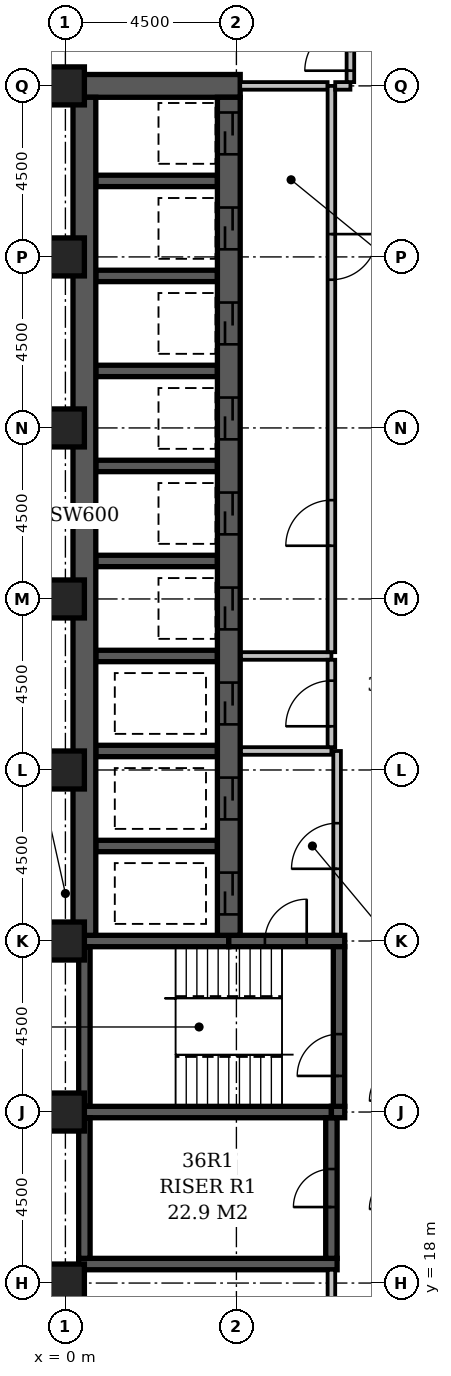
"""IFC4 building model, lengths in metres.
Left out: names, types, materials, properties, quantities, classifications, styles, units other than length and angle.
Written with IfcOpenShell. Run it as: python <this file> out.ifc"""

import sys

from ifc_helpers import new_model, si_unit, direction, frame, frame_2d, origin, origin_2d, place, context, subcontext, project, spatial, rectangle, extrude, element, fill, save


model = new_model("IFC4")
c1 = context("Model", 3, precision=1e-05, world=origin(), true_north=direction((0.0, 1.0)))
c2 = subcontext(c1, "Body", "Model", "MODEL_VIEW")
j1 = project(units=[si_unit("LENGTHUNIT", "METRE"), si_unit("PLANEANGLEUNIT", "RADIAN")], contexts=[c1])
p1 = place(None, origin())
s1 = spatial("IfcSite", under=j1, at=p1, CompositionType="ELEMENT")
p2 = place(p1, origin())
s2 = spatial("IfcBuilding", under=s1, at=p2, CompositionType="ELEMENT")
p3 = place(p2, frame((0.0, 0.0, 144.8)))
s3 = spatial("IfcBuildingStorey", under=s2, at=p3, CompositionType="ELEMENT", Elevation=144.8)
p4 = place(p3, frame((0.2, 49.5, -0.3), z_axis=(0.0, 0.0, 1.0), x_axis=(1.0, 0.0, 0.0)))
e1 = element("IfcWall", 1, at=p4, inside=s3, PredefinedType="SHEAR", context=c2, shape_type="SweptSolid", body=[
    extrude(rectangle(XDim=4.4, YDim=0.6, at=frame_2d((2.2, 0.0))), origin(), (0.0, 0.0, 1.0), 3.6),
])
p5 = place(p3, frame((0.35, 18.5, -0.3), z_axis=(0.0, 0.0, 1.0), x_axis=(1.0, 0.0, 0.0)))
e2 = element("IfcWall", 2, at=p5, inside=s3, PredefinedType="SHEAR", context=c2, shape_type="SweptSolid", body=[
    extrude(rectangle(XDim=6.8, YDim=0.3, at=frame_2d((3.4, 0.0))), origin(), (0.0, 0.0, 1.0), 3.6),
])
p6 = place(p3, frame((0.35, 22.5, -0.3), z_axis=(0.0, 0.0, 1.0), x_axis=(1.0, 0.0, 0.0)))
e3 = element("IfcWall", 3, at=p6, inside=s3, PredefinedType="SHEAR", context=c2, shape_type="SweptSolid", body=[
    extrude(rectangle(XDim=6.65, YDim=0.3, at=frame_2d((3.325, 0.0))), origin(), (0.0, 0.0, 1.0), 3.6),
])
p7 = place(p3, frame((0.35, 27.0, -0.3), z_axis=(0.0, 0.0, 1.0), x_axis=(1.0, 0.0, 0.0)))
e4 = element("IfcWall", 4, at=p7, inside=s3, PredefinedType="SHEAR", context=c2, shape_type="SweptSolid", body=[
    extrude(rectangle(XDim=3.95, YDim=0.3, at=frame_2d((1.975, 0.0))), origin(), (0.0, 0.0, 1.0), 3.6),
])
p8 = place(p3, frame((0.5, 18.65, -0.3), z_axis=(0.0, 0.0, 1.0), x_axis=(0.0, 1.0, 0.0)))
e5 = element("IfcWall", 5, at=p8, inside=s3, PredefinedType="SHEAR", context=c2, shape_type="SweptSolid", body=[
    extrude(rectangle(XDim=3.7, YDim=0.3, at=frame_2d((1.85, 0.0))), origin(), (0.0, 0.0, 1.0), 3.6),
])
p9 = place(p3, frame((0.5, 22.65, -0.3), z_axis=(0.0, 0.0, 1.0), x_axis=(0.0, 1.0, 0.0)))
e6 = element("IfcWall", 6, at=p9, inside=s3, PredefinedType="SHEAR", context=c2, shape_type="SweptSolid", body=[
    extrude(rectangle(XDim=4.2, YDim=0.3, at=frame_2d((2.1, 0.0))), origin(), (0.0, 0.0, 1.0), 3.6),
])
p10 = place(p3, frame((0.5, 27.15, -0.3), z_axis=(0.0, 0.0, 1.0), x_axis=(0.0, 1.0, 0.0)))
e7 = element("IfcWall", 7, at=p10, inside=s3, PredefinedType="SHEAR", context=c2, shape_type="SweptSolid", body=[
    extrude(rectangle(XDim=22.05, YDim=0.6, at=frame_2d((11.025, 0.0))), origin(), (0.0, 0.0, 1.0), 3.6),
])
for number, where, z_axis, x_axis in (
    (8, (0.8, 29.5, -0.3), (0.0, 0.0, 1.0), (1.0, 0.0, 0.0)),
    (9, (0.8, 32.0, -0.3), (0.0, 0.0, 1.0), (1.0, 0.0, 0.0)),
    (10, (0.8, 34.5, -0.3), (0.0, 0.0, 1.0), (1.0, 0.0, 0.0)),
    (11, (0.8, 37.0, -0.3), (0.0, 0.0, 1.0), (1.0, 0.0, 0.0)),
    (12, (0.8, 39.5, -0.3), (0.0, 0.0, 1.0), (1.0, 0.0, 0.0)),
    (13, (0.8, 42.0, -0.3), (0.0, 0.0, 1.0), (1.0, 0.0, 0.0)),
    (14, (0.8, 44.5, -0.3), (0.0, 0.0, 1.0), (1.0, 0.0, 0.0)),
    (15, (0.8, 47.0, -0.3), (0.0, 0.0, 1.0), (1.0, 0.0, 0.0)),
):
    element("IfcWall", number, at=place(p3, frame(where, z_axis=z_axis, x_axis=x_axis)), inside=s3, PredefinedType="SHEAR", context=c2, shape_type="SweptSolid", body=[
        extrude(rectangle(XDim=3.2, YDim=0.3, at=frame_2d((1.6, 0.0))), origin(), (0.0, 0.0, 1.0), 3.6),
    ])
p11 = place(p3, frame((4.3, 27.0, -0.3), z_axis=(0.0, 0.0, 1.0), x_axis=(1.0, 0.0, 0.0)))
e16 = element("IfcWall", 16, at=p11, inside=s3, PredefinedType="SHEAR", context=c2, shape_type="SweptSolid", body=[
    extrude(rectangle(XDim=3.05, YDim=0.3, at=frame_2d((1.525, 0.0))), origin(), (0.0, 0.0, 1.0), 3.6),
])
p12 = place(p11, frame((0.95, 0.0, 0.3)))
e17 = element("IfcOpeningElement", 17, at=p12, cuts=e16, PredefinedType="OPENING", context=c2, shape_type="SweptSolid", body=[
    extrude(rectangle(XDim=1.1, YDim=2.1, at=frame_2d((0.55, 1.05))), frame((0.0, 0.162, 0.0), z_axis=(0.0, -1.0, 0.0), x_axis=(1.0, 0.0, 0.0)), (0.0, 0.0, 1.0), 0.324),
])
p13 = place(p3, frame((4.3, 27.15, -0.3), z_axis=(0.0, 0.0, 1.0), x_axis=(0.0, 1.0, 0.0)))
e18 = element("IfcWall", 18, at=p13, inside=s3, PredefinedType="SHEAR", context=c2, shape_type="SweptSolid", body=[
    extrude(rectangle(XDim=22.05, YDim=0.6, at=frame_2d((11.025, 0.0))), origin(), (0.0, 0.0, 1.0), 3.6),
])
p14 = place(p13, frame((3.05, 0.0, 0.3)))
e19 = element("IfcOpeningElement", 19, at=p14, cuts=e18, PredefinedType="OPENING", context=c2, shape_type="SweptSolid", body=[
    extrude(rectangle(XDim=1.1, YDim=2.1, at=frame_2d((0.55, 1.05))), frame((0.0, 0.312, 0.0), z_axis=(0.0, -1.0, 0.0), x_axis=(1.0, 0.0, 0.0)), (0.0, 0.0, 1.0), 0.624),
])
p15 = place(p13, frame((0.55, 0.0, 0.3)))
e20 = element("IfcOpeningElement", 20, at=p15, cuts=e18, PredefinedType="OPENING", context=c2, shape_type="SweptSolid", body=[
    extrude(rectangle(XDim=1.1, YDim=2.1, at=frame_2d((0.55, 1.05))), frame((0.0, 0.312, 0.0), z_axis=(0.0, -1.0, 0.0), x_axis=(1.0, 0.0, 0.0)), (0.0, 0.0, 1.0), 0.624),
])
p16 = place(p13, frame((20.55, 0.0, 0.3)))
e21 = element("IfcOpeningElement", 21, at=p16, cuts=e18, PredefinedType="OPENING", context=c2, shape_type="SweptSolid", body=[
    extrude(rectangle(XDim=1.1, YDim=2.1, at=frame_2d((0.55, 1.05))), frame((0.0, 0.312, 0.0), z_axis=(0.0, -1.0, 0.0), x_axis=(1.0, 0.0, 0.0)), (0.0, 0.0, 1.0), 0.624),
])
p17 = place(p13, frame((18.05, 0.0, 0.3)))
e22 = element("IfcOpeningElement", 22, at=p17, cuts=e18, PredefinedType="OPENING", context=c2, shape_type="SweptSolid", body=[
    extrude(rectangle(XDim=1.1, YDim=2.1, at=frame_2d((0.55, 1.05))), frame((0.0, 0.312, 0.0), z_axis=(0.0, -1.0, 0.0), x_axis=(1.0, 0.0, 0.0)), (0.0, 0.0, 1.0), 0.624),
])
p18 = place(p13, frame((15.55, 0.0, 0.3)))
e23 = element("IfcOpeningElement", 23, at=p18, cuts=e18, PredefinedType="OPENING", context=c2, shape_type="SweptSolid", body=[
    extrude(rectangle(XDim=1.1, YDim=2.1, at=frame_2d((0.55, 1.05))), frame((0.0, 0.312, 0.0), z_axis=(0.0, -1.0, 0.0), x_axis=(1.0, 0.0, 0.0)), (0.0, 0.0, 1.0), 0.624),
])
p19 = place(p13, frame((13.05, 0.0, 0.3)))
e24 = element("IfcOpeningElement", 24, at=p19, cuts=e18, PredefinedType="OPENING", context=c2, shape_type="SweptSolid", body=[
    extrude(rectangle(XDim=1.1, YDim=2.1, at=frame_2d((0.55, 1.05))), frame((0.0, 0.312, 0.0), z_axis=(0.0, -1.0, 0.0), x_axis=(1.0, 0.0, 0.0)), (0.0, 0.0, 1.0), 0.624),
])
p20 = place(p13, frame((10.55, 0.0, 0.3)))
e25 = element("IfcOpeningElement", 25, at=p20, cuts=e18, PredefinedType="OPENING", context=c2, shape_type="SweptSolid", body=[
    extrude(rectangle(XDim=1.1, YDim=2.1, at=frame_2d((0.55, 1.05))), frame((0.0, 0.312, 0.0), z_axis=(0.0, -1.0, 0.0), x_axis=(1.0, 0.0, 0.0)), (0.0, 0.0, 1.0), 0.624),
])
p21 = place(p13, frame((8.05, 0.0, 0.3)))
e26 = element("IfcOpeningElement", 26, at=p21, cuts=e18, PredefinedType="OPENING", context=c2, shape_type="SweptSolid", body=[
    extrude(rectangle(XDim=1.1, YDim=2.1, at=frame_2d((0.55, 1.05))), frame((0.0, 0.312, 0.0), z_axis=(0.0, -1.0, 0.0), x_axis=(1.0, 0.0, 0.0)), (0.0, 0.0, 1.0), 0.624),
])
p22 = place(p13, frame((5.55, 0.0, 0.3)))
e27 = element("IfcOpeningElement", 27, at=p22, cuts=e18, PredefinedType="OPENING", context=c2, shape_type="SweptSolid", body=[
    extrude(rectangle(XDim=1.1, YDim=2.1, at=frame_2d((0.55, 1.05))), frame((0.0, 0.312, 0.0), z_axis=(0.0, -1.0, 0.0), x_axis=(1.0, 0.0, 0.0)), (0.0, 0.0, 1.0), 0.624),
])
p23 = place(p3, frame((7.0, 18.65, -0.3), z_axis=(0.0, 0.0, 1.0), x_axis=(0.0, 1.0, 0.0)))
e28 = element("IfcWall", 28, at=p23, inside=s3, PredefinedType="SHEAR", context=c2, shape_type="SweptSolid", body=[
    extrude(rectangle(XDim=3.7, YDim=0.3, at=frame_2d((1.85, 0.0))), origin(), (0.0, 0.0, 1.0), 3.6),
])
p24 = place(p23, frame((1.35, 0.0, 0.3)))
e29 = element("IfcOpeningElement", 29, at=p24, cuts=e28, PredefinedType="OPENING", context=c2, shape_type="SweptSolid", body=[
    extrude(rectangle(XDim=1.0, YDim=2.1, at=frame_2d((0.5, 1.05))), frame((0.0, 0.162, 0.0), z_axis=(0.0, -1.0, 0.0), x_axis=(1.0, 0.0, 0.0)), (0.0, 0.0, 1.0), 0.324),
])
p25 = place(p3, frame((7.0, 22.5, -0.3), z_axis=(0.0, 0.0, 1.0), x_axis=(1.0, 0.0, 0.0)))
e30 = element("IfcWall", 30, at=p25, inside=s3, PredefinedType="SHEAR", context=c2, shape_type="SweptSolid", body=[
    extrude(rectangle(XDim=0.35, YDim=0.3, at=frame_2d((0.175, 0.0))), origin(), (0.0, 0.0, 1.0), 3.6),
])
p26 = place(p3, frame((7.2, 22.65, -0.3), z_axis=(0.0, 0.0, 1.0), x_axis=(0.0, 1.0, 0.0)))
e31 = element("IfcWall", 31, at=p26, inside=s3, PredefinedType="SHEAR", context=c2, shape_type="SweptSolid", body=[
    extrude(rectangle(XDim=4.2, YDim=0.3, at=frame_2d((2.1, 0.0))), origin(), (0.0, 0.0, 1.0), 3.6),
])
p27 = place(p26, frame((0.8, 0.0, 0.3)))
e32 = element("IfcOpeningElement", 32, at=p27, cuts=e31, PredefinedType="OPENING", context=c2, shape_type="SweptSolid", body=[
    extrude(rectangle(XDim=1.1, YDim=2.1, at=frame_2d((0.55, 1.05))), frame((0.0, 0.162, 0.0), z_axis=(0.0, -1.0, 0.0), x_axis=(1.0, 0.0, 0.0)), (0.0, 0.0, 1.0), 0.324),
])
for number, where, z_axis, x_axis in (
    (33, (0.0, 18.0, -0.3), (0.0, 0.0, 1.0), (1.0, 0.0, 0.0)),
    (34, (0.0, 22.5, -0.3), (0.0, 0.0, 1.0), (1.0, 0.0, 0.0)),
    (35, (0.0, 27.0, -0.3), (0.0, 0.0, 1.0), (1.0, 0.0, 0.0)),
    (36, (0.0, 31.5, -0.3), (0.0, 0.0, 1.0), (1.0, 0.0, 0.0)),
    (37, (0.0, 36.0, -0.3), (0.0, 0.0, 1.0), (1.0, 0.0, 0.0)),
    (38, (0.0, 40.5, -0.3), (0.0, 0.0, 1.0), (1.0, 0.0, 0.0)),
    (39, (0.0, 45.0, -0.3), (0.0, 0.0, 1.0), (1.0, 0.0, 0.0)),
    (40, (0.0, 49.5, -0.3), (0.0, 0.0, 1.0), (1.0, 0.0, 0.0)),
):
    element("IfcColumn", number, at=place(p3, frame(where, z_axis=z_axis, x_axis=x_axis)), inside=s3, PredefinedType="COLUMN", context=c2, shape_type="SweptSolid", body=[
        extrude(rectangle(XDim=1.0, YDim=1.0, at=origin_2d()), origin(), (0.0, 0.0, 1.0), 3.6),
    ])
p28 = place(p3, frame((4.62, 34.5, 0.0), z_axis=(0.0, 0.0, 1.0), x_axis=(1.0, 0.0, 0.0)))
e41 = element("IfcWall", 41, at=p28, inside=s3, PredefinedType="PARTITIONING", context=c2, shape_type="SweptSolid", body=[
    extrude(rectangle(XDim=2.38, YDim=0.2, at=frame_2d((1.19, 0.0))), origin(), (0.0, 0.0, 1.0), 3.3),
])
p29 = place(p3, frame((7.0, 34.6, 0.0), z_axis=(0.0, 0.0, 1.0), x_axis=(0.0, 1.0, 0.0)))
e42 = element("IfcWall", 42, at=p29, inside=s3, PredefinedType="PARTITIONING", context=c2, shape_type="SweptSolid", body=[
    extrude(rectangle(XDim=14.9, YDim=0.2, at=frame_2d((7.45, 0.0))), origin(), (0.0, 0.0, 1.0), 3.3),
])
p30 = place(p29, frame((2.8, 0.0, 0.0)))
e43 = element("IfcOpeningElement", 43, at=p30, cuts=e42, PredefinedType="OPENING", context=c2, shape_type="SweptSolid", body=[
    extrude(rectangle(XDim=1.2, YDim=2.1, at=frame_2d((0.6, 1.05))), frame((0.0, 0.112, 0.0), z_axis=(0.0, -1.0, 0.0), x_axis=(1.0, 0.0, 0.0)), (0.0, 0.0, 1.0), 0.224),
])
p31 = place(p29, frame((9.8, 0.0, 0.0)))
e44 = element("IfcOpeningElement", 44, at=p31, cuts=e42, PredefinedType="OPENING", context=c2, shape_type="SweptSolid", body=[
    extrude(rectangle(XDim=1.2, YDim=2.1, at=frame_2d((0.6, 1.05))), frame((0.0, 0.112, 0.0), z_axis=(0.0, -1.0, 0.0), x_axis=(1.0, 0.0, 0.0)), (0.0, 0.0, 1.0), 0.224),
])
p32 = place(p3, frame((4.6, 49.5, 0.0), z_axis=(0.0, 0.0, 1.0), x_axis=(1.0, 0.0, 0.0)))
e45 = element("IfcWall", 45, at=p32, inside=s3, PredefinedType="PARTITIONING", context=c2, shape_type="SweptSolid", body=[
    extrude(rectangle(XDim=2.3, YDim=0.2, at=frame_2d((1.15, 0.0))), origin(), (0.0, 0.0, 1.0), 3.3),
])
p33 = place(p3, frame((4.62, 32.0, 0.0), z_axis=(0.0, 0.0, 1.0), x_axis=(1.0, 0.0, 0.0)))
e46 = element("IfcWall", 46, at=p33, inside=s3, PredefinedType="PARTITIONING", context=c2, shape_type="SweptSolid", body=[
    extrude(rectangle(XDim=2.38, YDim=0.2, at=frame_2d((1.19, 0.0))), origin(), (0.0, 0.0, 1.0), 3.3),
])
p34 = place(p3, frame((7.0, 32.1, 0.0), z_axis=(0.0, 0.0, 1.0), x_axis=(0.0, 1.0, 0.0)))
e47 = element("IfcWall", 47, at=p34, inside=s3, PredefinedType="PARTITIONING", context=c2, shape_type="SweptSolid", body=[
    extrude(rectangle(XDim=2.3, YDim=0.2, at=frame_2d((1.15, 0.0))), origin(), (0.0, 0.0, 1.0), 3.3),
])
p35 = place(p34, frame((0.55, 0.0, 0.0)))
e48 = element("IfcOpeningElement", 48, at=p35, cuts=e47, PredefinedType="OPENING", context=c2, shape_type="SweptSolid", body=[
    extrude(rectangle(XDim=1.2, YDim=2.1, at=frame_2d((0.6, 1.05))), frame((0.0, 0.112, 0.0), z_axis=(0.0, -1.0, 0.0), x_axis=(1.0, 0.0, 0.0)), (0.0, 0.0, 1.0), 0.224),
])
p36 = place(p3, frame((7.15, 27.17, 0.0), z_axis=(0.0, 0.0, 1.0), x_axis=(0.0, 1.0, 0.0)))
e49 = element("IfcWall", 49, at=p36, inside=s3, PredefinedType="PARTITIONING", context=c2, shape_type="SweptSolid", body=[
    extrude(rectangle(XDim=4.83, YDim=0.2, at=frame_2d((2.415, 0.0))), origin(), (0.0, 0.0, 1.0), 3.3),
])
p37 = place(p36, frame((1.73, 0.0, 0.0)))
e50 = element("IfcOpeningElement", 50, at=p37, cuts=e49, PredefinedType="OPENING", context=c2, shape_type="SweptSolid", body=[
    extrude(rectangle(XDim=1.2, YDim=2.1, at=frame_2d((0.6, 1.05))), frame((0.0, 0.112, 0.0), z_axis=(0.0, -1.0, 0.0), x_axis=(1.0, 0.0, 0.0)), (0.0, 0.0, 1.0), 0.224),
])
p38 = place(p3, frame((7.1, 49.5, 0.0), z_axis=(0.0, 0.0, 1.0), x_axis=(1.0, 0.0, 0.0)))
e51 = element("IfcWall", 51, at=p38, inside=s3, PredefinedType="PARTITIONING", context=c2, shape_type="SweptSolid", body=[
    extrude(rectangle(XDim=0.4, YDim=0.2, at=frame_2d((0.2, 0.0))), origin(), (0.0, 0.0, 1.0), 3.3),
])
p39 = place(p3, frame((7.5, 49.6, 0.0), z_axis=(0.0, 0.0, 1.0), x_axis=(0.0, 1.0, 0.0)))
e52 = element("IfcWall", 52, at=p39, inside=s3, PredefinedType="PARTITIONING", context=c2, shape_type="SweptSolid", body=[
    extrude(rectangle(XDim=3.9, YDim=0.2, at=frame_2d((1.95, 0.0))), origin(), (0.0, 0.0, 1.0), 3.3),
])
p40 = place(p39, frame((0.3, 0.0, 0.0)))
e53 = element("IfcOpeningElement", 53, at=p40, cuts=e52, PredefinedType="OPENING", context=c2, shape_type="SweptSolid", body=[
    extrude(rectangle(XDim=1.2, YDim=2.1, at=frame_2d((0.6, 1.05))), frame((0.0, 0.112, 0.0), z_axis=(0.0, -1.0, 0.0), x_axis=(1.0, 0.0, 0.0)), (0.0, 0.0, 1.0), 0.224),
])
p41 = place(p3, frame((7.0, 14.15, 0.0), z_axis=(0.0, 0.0, 1.0), x_axis=(0.0, 1.0, 0.0)))
e54 = element("IfcWall", 54, at=p41, inside=s3, PredefinedType="PARTITIONING", context=c2, shape_type="SweptSolid", body=[
    extrude(rectangle(XDim=4.2, YDim=0.2, at=frame_2d((2.1, 0.0))), origin(), (0.0, 0.0, 1.0), 3.3),
])
p42 = place(p41, frame((1.6, 0.0, 0.0)))
e55 = element("IfcOpeningElement", 55, at=p42, cuts=e54, PredefinedType="OPENING", context=c2, shape_type="SweptSolid", body=[
    extrude(rectangle(XDim=1.0, YDim=2.1, at=frame_2d((0.5, 1.05))), frame((0.0, 0.112, 0.0), z_axis=(0.0, -1.0, 0.0), x_axis=(1.0, 0.0, 0.0)), (0.0, 0.0, 1.0), 0.224),
])
p43 = place(p40, origin())
e56 = element("IfcDoor", 56, at=p43, inside=s3, OperationType="SINGLE_SWING_LEFT", PredefinedType="DOOR", context=c2, shape_type="SweptSolid", body=[
    extrude(rectangle(XDim=1.2, YDim=2.1, at=frame_2d((0.6, 1.05))), frame((0.0, 0.025, 0.0), z_axis=(0.0, -1.0, 0.0), x_axis=(1.0, 0.0, 0.0)), (0.0, 0.0, 1.0), 0.05),
])
fill(e53, e56)
p44 = place(p37, origin())
e57 = element("IfcDoor", 57, at=p44, inside=s3, OperationType="SINGLE_SWING_LEFT", PredefinedType="DOOR", context=c2, shape_type="SweptSolid", body=[
    extrude(rectangle(XDim=1.2, YDim=2.1, at=frame_2d((0.6, 1.05))), frame((0.0, 0.025, 0.0), z_axis=(0.0, -1.0, 0.0), x_axis=(1.0, 0.0, 0.0)), (0.0, 0.0, 1.0), 0.05),
])
fill(e50, e57)
p45 = place(p14, origin())
e58 = element("IfcDoor", 58, at=p45, inside=s3, OperationType="SLIDING_TO_LEFT", PredefinedType="DOOR", context=c2, shape_type="SweptSolid", body=[
    extrude(rectangle(XDim=1.1, YDim=2.1, at=frame_2d((0.55, 1.05))), frame((0.0, 0.025, 0.0), z_axis=(0.0, -1.0, 0.0), x_axis=(1.0, 0.0, 0.0)), (0.0, 0.0, 1.0), 0.05),
])
fill(e19, e58)
p46 = place(p15, origin())
e59 = element("IfcDoor", 59, at=p46, inside=s3, OperationType="SLIDING_TO_LEFT", PredefinedType="DOOR", context=c2, shape_type="SweptSolid", body=[
    extrude(rectangle(XDim=1.1, YDim=2.1, at=frame_2d((0.55, 1.05))), frame((0.0, 0.025, 0.0), z_axis=(0.0, -1.0, 0.0), x_axis=(1.0, 0.0, 0.0)), (0.0, 0.0, 1.0), 0.05),
])
fill(e20, e59)
p47 = place(p16, origin())
e60 = element("IfcDoor", 60, at=p47, inside=s3, OperationType="SLIDING_TO_LEFT", PredefinedType="DOOR", context=c2, shape_type="SweptSolid", body=[
    extrude(rectangle(XDim=1.1, YDim=2.1, at=frame_2d((0.55, 1.05))), frame((0.0, 0.025, 0.0), z_axis=(0.0, -1.0, 0.0), x_axis=(1.0, 0.0, 0.0)), (0.0, 0.0, 1.0), 0.05),
])
fill(e21, e60)
p48 = place(p17, origin())
e61 = element("IfcDoor", 61, at=p48, inside=s3, OperationType="SLIDING_TO_LEFT", PredefinedType="DOOR", context=c2, shape_type="SweptSolid", body=[
    extrude(rectangle(XDim=1.1, YDim=2.1, at=frame_2d((0.55, 1.05))), frame((0.0, 0.025, 0.0), z_axis=(0.0, -1.0, 0.0), x_axis=(1.0, 0.0, 0.0)), (0.0, 0.0, 1.0), 0.05),
])
fill(e22, e61)
p49 = place(p18, origin())
e62 = element("IfcDoor", 62, at=p49, inside=s3, OperationType="SLIDING_TO_LEFT", PredefinedType="DOOR", context=c2, shape_type="SweptSolid", body=[
    extrude(rectangle(XDim=1.1, YDim=2.1, at=frame_2d((0.55, 1.05))), frame((0.0, 0.025, 0.0), z_axis=(0.0, -1.0, 0.0), x_axis=(1.0, 0.0, 0.0)), (0.0, 0.0, 1.0), 0.05),
])
fill(e23, e62)
p50 = place(p19, origin())
e63 = element("IfcDoor", 63, at=p50, inside=s3, OperationType="SLIDING_TO_LEFT", PredefinedType="DOOR", context=c2, shape_type="SweptSolid", body=[
    extrude(rectangle(XDim=1.1, YDim=2.1, at=frame_2d((0.55, 1.05))), frame((0.0, 0.025, 0.0), z_axis=(0.0, -1.0, 0.0), x_axis=(1.0, 0.0, 0.0)), (0.0, 0.0, 1.0), 0.05),
])
fill(e24, e63)
p51 = place(p20, origin())
e64 = element("IfcDoor", 64, at=p51, inside=s3, OperationType="SLIDING_TO_LEFT", PredefinedType="DOOR", context=c2, shape_type="SweptSolid", body=[
    extrude(rectangle(XDim=1.1, YDim=2.1, at=frame_2d((0.55, 1.05))), frame((0.0, 0.025, 0.0), z_axis=(0.0, -1.0, 0.0), x_axis=(1.0, 0.0, 0.0)), (0.0, 0.0, 1.0), 0.05),
])
fill(e25, e64)
p52 = place(p21, origin())
e65 = element("IfcDoor", 65, at=p52, inside=s3, OperationType="SLIDING_TO_LEFT", PredefinedType="DOOR", context=c2, shape_type="SweptSolid", body=[
    extrude(rectangle(XDim=1.1, YDim=2.1, at=frame_2d((0.55, 1.05))), frame((0.0, 0.025, 0.0), z_axis=(0.0, -1.0, 0.0), x_axis=(1.0, 0.0, 0.0)), (0.0, 0.0, 1.0), 0.05),
])
fill(e26, e65)
p53 = place(p30, origin())
e66 = element("IfcDoor", 66, at=p53, inside=s3, OperationType="SINGLE_SWING_LEFT", PredefinedType="DOOR", context=c2, shape_type="SweptSolid", body=[
    extrude(rectangle(XDim=1.2, YDim=2.1, at=frame_2d((0.6, 1.05))), frame((0.0, 0.025, 0.0), z_axis=(0.0, -1.0, 0.0), x_axis=(1.0, 0.0, 0.0)), (0.0, 0.0, 1.0), 0.05),
])
fill(e43, e66)
p54 = place(p31, origin())
e67 = element("IfcDoor", 67, at=p54, inside=s3, OperationType="SINGLE_SWING_RIGHT", PredefinedType="DOOR", context=c2, shape_type="SweptSolid", body=[
    extrude(rectangle(XDim=1.2, YDim=2.1, at=frame_2d((0.6, 1.05))), frame((0.0, 0.025, 0.0), z_axis=(0.0, -1.0, 0.0), x_axis=(1.0, 0.0, 0.0)), (0.0, 0.0, 1.0), 0.05),
])
fill(e44, e67)
p55 = place(p35, origin())
e68 = element("IfcDoor", 68, at=p55, inside=s3, OperationType="SINGLE_SWING_LEFT", PredefinedType="DOOR", context=c2, shape_type="SweptSolid", body=[
    extrude(rectangle(XDim=1.2, YDim=2.1, at=frame_2d((0.6, 1.05))), frame((0.0, 0.025, 0.0), z_axis=(0.0, -1.0, 0.0), x_axis=(1.0, 0.0, 0.0)), (0.0, 0.0, 1.0), 0.05),
])
fill(e48, e68)
p56 = place(p22, origin())
e69 = element("IfcDoor", 69, at=p56, inside=s3, OperationType="SLIDING_TO_LEFT", PredefinedType="DOOR", context=c2, shape_type="SweptSolid", body=[
    extrude(rectangle(XDim=1.1, YDim=2.1, at=frame_2d((0.55, 1.05))), frame((0.0, 0.025, 0.0), z_axis=(0.0, -1.0, 0.0), x_axis=(1.0, 0.0, 0.0)), (0.0, 0.0, 1.0), 0.05),
])
fill(e27, e69)
p57 = place(p24, origin())
e70 = element("IfcDoor", 70, at=p57, inside=s3, OperationType="SINGLE_SWING_LEFT", PredefinedType="DOOR", context=c2, shape_type="SweptSolid", body=[
    extrude(rectangle(XDim=1.0, YDim=2.1, at=frame_2d((0.5, 1.05))), frame((0.0, 0.025, 0.0), z_axis=(0.0, -1.0, 0.0), x_axis=(1.0, 0.0, 0.0)), (0.0, 0.0, 1.0), 0.05),
])
fill(e29, e70)
p58 = place(p12, frame((1.1, 0.0, 0.0), z_axis=(0.0, 0.0, 1.0), x_axis=(-1.0, 0.0, 0.0)))
e71 = element("IfcDoor", 71, at=p58, inside=s3, OperationType="SINGLE_SWING_LEFT", PredefinedType="DOOR", context=c2, shape_type="SweptSolid", body=[
    extrude(rectangle(XDim=1.1, YDim=2.1, at=frame_2d((0.55, 1.05))), frame((0.0, 0.025, 0.0), z_axis=(0.0, -1.0, 0.0), x_axis=(1.0, 0.0, 0.0)), (0.0, 0.0, 1.0), 0.05),
])
fill(e17, e71)
p59 = place(p27, origin())
e72 = element("IfcDoor", 72, at=p59, inside=s3, OperationType="SINGLE_SWING_LEFT", PredefinedType="DOOR", context=c2, shape_type="SweptSolid", body=[
    extrude(rectangle(XDim=1.1, YDim=2.1, at=frame_2d((0.55, 1.05))), frame((0.0, 0.025, 0.0), z_axis=(0.0, -1.0, 0.0), x_axis=(1.0, 0.0, 0.0)), (0.0, 0.0, 1.0), 0.05),
])
fill(e32, e72)
save(model, sys.argv[1])
